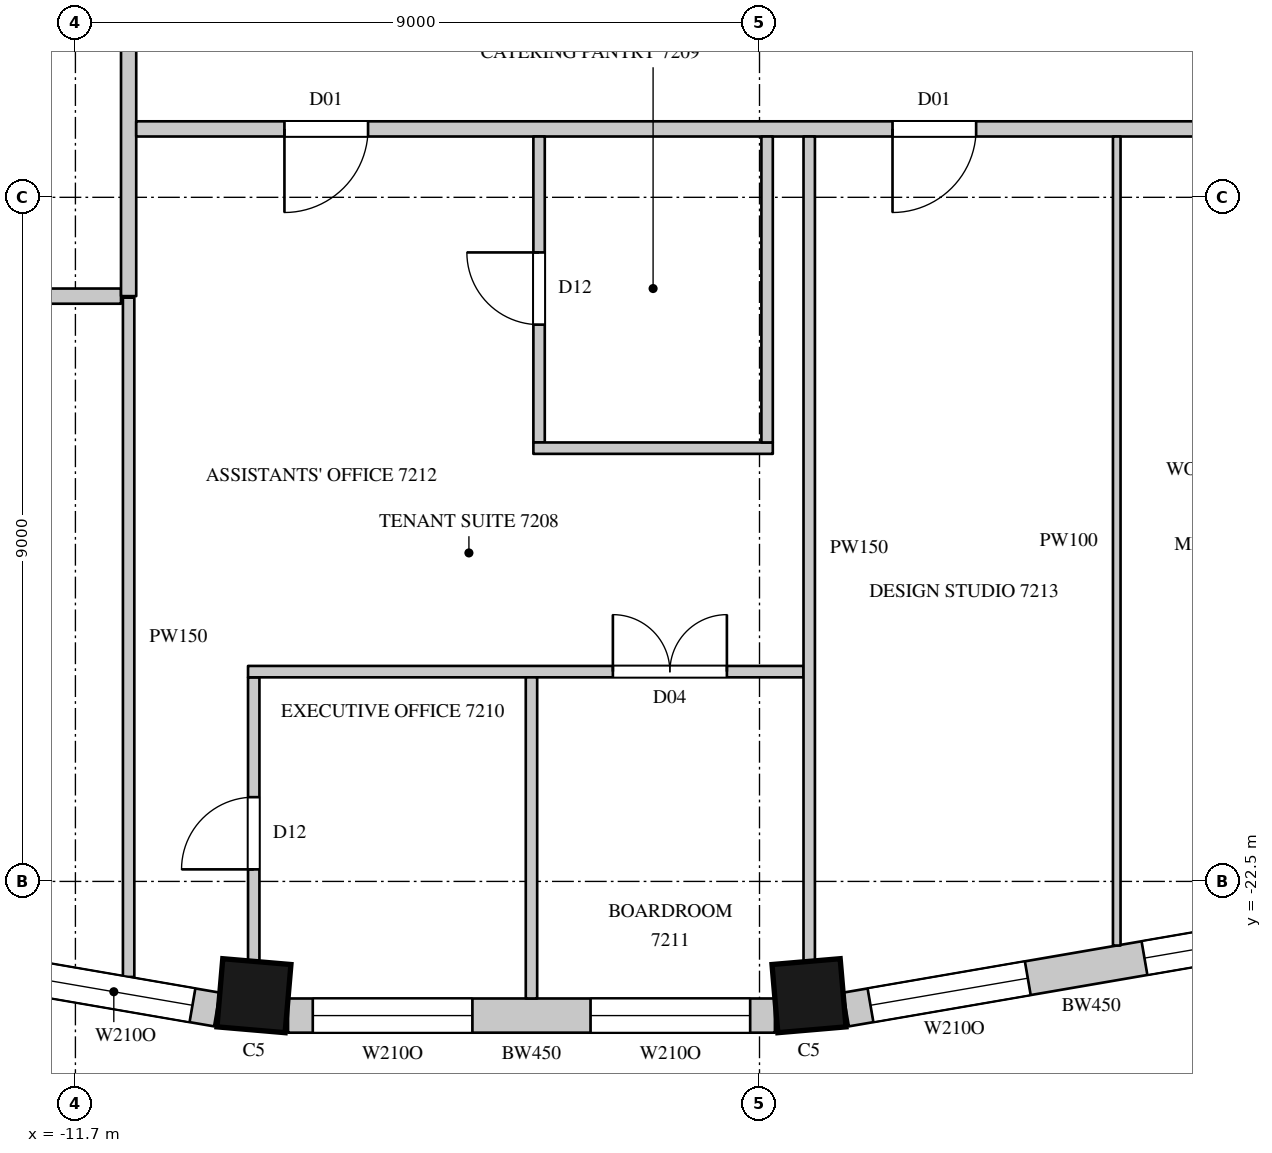
"""IFC4 building model, lengths in metres.
Left out: names, types, materials, properties, quantities, classifications, styles, units other than length and angle.
Written with IfcOpenShell. Run it as: python <this file> out.ifc"""

import sys

from ifc_helpers import new_model, si_unit, direction, frame, frame_2d, origin, origin_2d, place, context, subcontext, project, spatial, rectangle, extrude, element, fill, save


model = new_model("IFC4")
c1 = context("Model", 3, precision=1e-05, world=origin(), true_north=direction((0.0, 1.0)))
c2 = subcontext(c1, "Body", "Model", "MODEL_VIEW")
j1 = project(units=[si_unit("LENGTHUNIT", "METRE"), si_unit("PLANEANGLEUNIT", "RADIAN")], contexts=[c1])
p1 = place(None, origin())
s1 = spatial("IfcSite", under=j1, at=p1, CompositionType="ELEMENT")
p2 = place(p1, origin())
s2 = spatial("IfcBuilding", under=s1, at=p2, CompositionType="ELEMENT")
p3 = place(p2, frame((0.0, 0.0, 317.2)))
s3 = spatial("IfcBuildingStorey", under=s2, at=p3, CompositionType="ELEMENT", Elevation=317.2)
for number, where, z_axis, x_axis in (
    (1, (-9.351, -24.003, 0.0), (0.0, 0.0, 1.0), (0.996, -0.085, 0.0)),
    (2, (-2.049, -24.003, 0.0), (0.0, 0.0, 1.0), (0.996, 0.085, 0.0)),
):
    element("IfcColumn", number, at=place(p3, frame(where, z_axis=z_axis, x_axis=x_axis)), inside=s3, PredefinedType="COLUMN", context=c2, shape_type="SweptSolid", body=[
        extrude(rectangle(XDim=0.9, YDim=0.9, at=origin_2d()), origin(), (0.0, 0.0, 1.0), 4.1),
    ])
p4 = place(p3, frame((-16.157, -23.097, 0.0), z_axis=(0.0, 0.0, 1.0), x_axis=(0.985502073964, -0.169663379113, 0.0)))
e3 = element("IfcWall", 3, at=p4, inside=s3, PredefinedType="SOLIDWALL", context=c2, shape_type="SweptSolid", body=[
    extrude(rectangle(XDim=6.412, YDim=0.45, at=frame_2d((3.206, 0.0))), origin(), (0.0, 0.0, 1.0), 3.8),
])
p5 = place(p4, frame((0.327, 0.0, 1.05)))
e4 = element("IfcOpeningElement", 4, at=p5, cuts=e3, PredefinedType="OPENING", context=c2, shape_type="SweptSolid", body=[
    extrude(rectangle(XDim=2.1, YDim=2.4, at=frame_2d((1.05, 1.2))), frame((0.0, 0.235, 0.0), z_axis=(0.0, -1.0, 0.0), x_axis=(1.0, 0.0, 0.0)), (0.0, 0.0, 1.0), 0.47),
])
p6 = place(p4, frame((3.985, 0.0, 1.05)))
e5 = element("IfcOpeningElement", 5, at=p6, cuts=e3, PredefinedType="OPENING", context=c2, shape_type="SweptSolid", body=[
    extrude(rectangle(XDim=2.1, YDim=2.4, at=frame_2d((1.05, 1.2))), frame((0.0, 0.235, 0.0), z_axis=(0.0, -1.0, 0.0), x_axis=(1.0, 0.0, 0.0)), (0.0, 0.0, 1.0), 0.47),
])
p7 = place(p3, frame((-8.903, -24.265, 0.0), z_axis=(0.0, 0.0, 1.0), x_axis=(1.0, 0.0, 0.0)))
e6 = element("IfcWall", 6, at=p7, inside=s3, PredefinedType="SOLIDWALL", context=c2, shape_type="SweptSolid", body=[
    extrude(rectangle(XDim=6.406, YDim=0.45, at=frame_2d((3.203, 0.0))), origin(), (0.0, 0.0, 1.0), 3.8),
])
p8 = place(p7, frame((0.325, 0.0, 1.05)))
e7 = element("IfcOpeningElement", 7, at=p8, cuts=e6, PredefinedType="OPENING", context=c2, shape_type="SweptSolid", body=[
    extrude(rectangle(XDim=2.1, YDim=2.4, at=frame_2d((1.05, 1.2))), frame((0.0, 0.235, 0.0), z_axis=(0.0, -1.0, 0.0), x_axis=(1.0, 0.0, 0.0)), (0.0, 0.0, 1.0), 0.47),
])
p9 = place(p7, frame((3.98, 0.0, 1.05)))
e8 = element("IfcOpeningElement", 8, at=p9, cuts=e6, PredefinedType="OPENING", context=c2, shape_type="SweptSolid", body=[
    extrude(rectangle(XDim=2.1, YDim=2.4, at=frame_2d((1.05, 1.2))), frame((0.0, 0.235, 0.0), z_axis=(0.0, -1.0, 0.0), x_axis=(1.0, 0.0, 0.0)), (0.0, 0.0, 1.0), 0.47),
])
p10 = place(p3, frame((-1.562, -24.185, 0.0), z_axis=(0.0, 0.0, 1.0), x_axis=(0.985502073964, 0.169663379113, 0.0)))
e9 = element("IfcWall", 9, at=p10, inside=s3, PredefinedType="SOLIDWALL", context=c2, shape_type="SweptSolid", body=[
    extrude(rectangle(XDim=6.412, YDim=0.45, at=frame_2d((3.206, 0.0))), origin(), (0.0, 0.0, 1.0), 3.8),
])
p11 = place(p10, frame((0.327, 0.0, 1.05)))
e10 = element("IfcOpeningElement", 10, at=p11, cuts=e9, PredefinedType="OPENING", context=c2, shape_type="SweptSolid", body=[
    extrude(rectangle(XDim=2.1, YDim=2.4, at=frame_2d((1.05, 1.2))), frame((0.0, 0.235, 0.0), z_axis=(0.0, -1.0, 0.0), x_axis=(1.0, 0.0, 0.0)), (0.0, 0.0, 1.0), 0.47),
])
p12 = place(p10, frame((3.985, 0.0, 1.05)))
e11 = element("IfcOpeningElement", 11, at=p12, cuts=e9, PredefinedType="OPENING", context=c2, shape_type="SweptSolid", body=[
    extrude(rectangle(XDim=2.1, YDim=2.4, at=frame_2d((1.05, 1.2))), frame((0.0, 0.235, 0.0), z_axis=(0.0, -1.0, 0.0), x_axis=(1.0, 0.0, 0.0)), (0.0, 0.0, 1.0), 0.47),
])
p13 = place(p3, frame((-13.97, -14.8, 0.0), z_axis=(0.0, 0.0, 1.0), x_axis=(1.0, 0.0, 0.0)))
e12 = element("IfcWall", 12, at=p13, inside=s3, PredefinedType="PARTITIONING", context=c2, shape_type="SweptSolid", body=[
    extrude(rectangle(XDim=2.87, YDim=0.2, at=frame_2d((1.435, 0.0))), origin(), (0.0, 0.0, 1.0), 3.8),
])
p14 = place(p3, frame((-11.0, -14.8, 0.0), z_axis=(0.0, 0.0, 1.0), x_axis=(0.0, 1.0, 0.0)))
e13 = element("IfcWall", 13, at=p14, inside=s3, PredefinedType="PARTITIONING", context=c2, shape_type="SweptSolid", body=[
    extrude(rectangle(XDim=29.5, YDim=0.2, at=frame_2d((14.75, 0.0))), origin(), (0.0, 0.0, 1.0), 3.8),
])
p15 = place(p14, frame((7.75, 0.0, 0.0)))
e14 = element("IfcOpeningElement", 14, at=p15, cuts=e13, PredefinedType="OPENING", context=c2, shape_type="SweptSolid", body=[
    extrude(rectangle(XDim=1.5, YDim=2.4, at=frame_2d((0.75, 1.2))), frame((0.0, 0.11, 0.0), z_axis=(0.0, -1.0, 0.0), x_axis=(1.0, 0.0, 0.0)), (0.0, 0.0, 1.0), 0.22),
])
p16 = place(p3, frame((-10.9, -12.6, 0.0), z_axis=(0.0, 0.0, 1.0), x_axis=(1.0, 0.0, 0.0)))
e15 = element("IfcWall", 15, at=p16, inside=s3, PredefinedType="PARTITIONING", context=c2, shape_type="SweptSolid", body=[
    extrude(rectangle(XDim=22.6, YDim=0.2, at=frame_2d((11.3, 0.0))), origin(), (0.0, 0.0, 1.0), 3.8),
])
p17 = place(p16, frame((14.1, 0.0, 0.0)))
e16 = element("IfcOpeningElement", 16, at=p17, cuts=e15, PredefinedType="OPENING", context=c2, shape_type="SweptSolid", body=[
    extrude(rectangle(XDim=0.9, YDim=2.2, at=frame_2d((0.45, 1.1))), frame((0.0, 0.11, 0.0), z_axis=(0.0, -1.0, 0.0), x_axis=(1.0, 0.0, 0.0)), (0.0, 0.0, 1.0), 0.22),
])
p18 = place(p16, frame((17.4, 0.0, 0.0)))
e17 = element("IfcOpeningElement", 17, at=p18, cuts=e15, PredefinedType="OPENING", context=c2, shape_type="SweptSolid", body=[
    extrude(rectangle(XDim=0.9, YDim=2.2, at=frame_2d((0.45, 1.1))), frame((0.0, 0.11, 0.0), z_axis=(0.0, -1.0, 0.0), x_axis=(1.0, 0.0, 0.0)), (0.0, 0.0, 1.0), 0.22),
])
p19 = place(p16, frame((20.25, 0.0, 0.0)))
e18 = element("IfcOpeningElement", 18, at=p19, cuts=e15, PredefinedType="OPENING", context=c2, shape_type="SweptSolid", body=[
    extrude(rectangle(XDim=0.9, YDim=2.2, at=frame_2d((0.45, 1.1))), frame((0.0, 0.11, 0.0), z_axis=(0.0, -1.0, 0.0), x_axis=(1.0, 0.0, 0.0)), (0.0, 0.0, 1.0), 0.22),
])
p20 = place(p16, frame((1.95, 0.0, 0.0)))
e19 = element("IfcOpeningElement", 19, at=p20, cuts=e15, PredefinedType="OPENING", context=c2, shape_type="SweptSolid", body=[
    extrude(rectangle(XDim=1.1, YDim=2.4, at=frame_2d((0.55, 1.2))), frame((0.0, 0.11, 0.0), z_axis=(0.0, -1.0, 0.0), x_axis=(1.0, 0.0, 0.0)), (0.0, 0.0, 1.0), 0.22),
])
p21 = place(p16, frame((9.95, 0.0, 0.0)))
e20 = element("IfcOpeningElement", 20, at=p21, cuts=e15, PredefinedType="OPENING", context=c2, shape_type="SweptSolid", body=[
    extrude(rectangle(XDim=1.1, YDim=2.4, at=frame_2d((0.55, 1.2))), frame((0.0, 0.11, 0.0), z_axis=(0.0, -1.0, 0.0), x_axis=(1.0, 0.0, 0.0)), (0.0, 0.0, 1.0), 0.22),
])
p22 = place(p3, frame((-11.0, -23.757, 0.0), z_axis=(0.0, 0.0, 1.0), x_axis=(0.0, 1.0, 0.0)))
e21 = element("IfcWall", 21, at=p22, inside=s3, PredefinedType="PARTITIONING", context=c2, shape_type="SweptSolid", body=[
    extrude(rectangle(XDim=8.937, YDim=0.15, at=frame_2d((4.468, 0.0))), origin(), (0.0, 0.0, 1.0), 3.8),
])
p23 = place(p3, frame((-9.354, -23.542, 0.0), z_axis=(0.0, 0.0, 1.0), x_axis=(0.0, 1.0, 0.0)))
e22 = element("IfcWall", 22, at=p23, inside=s3, PredefinedType="PARTITIONING", context=c2, shape_type="SweptSolid", body=[
    extrude(rectangle(XDim=3.727, YDim=0.15, at=frame_2d((1.863, 0.0))), origin(), (0.0, 0.0, 1.0), 3.8),
])
p24 = place(p23, frame((1.2, 0.0, 0.0)))
e23 = element("IfcOpeningElement", 23, at=p24, cuts=e22, PredefinedType="OPENING", context=c2, shape_type="SweptSolid", body=[
    extrude(rectangle(XDim=0.95, YDim=2.2, at=frame_2d((0.475, 1.1))), frame((0.0, 0.085, 0.0), z_axis=(0.0, -1.0, 0.0), x_axis=(1.0, 0.0, 0.0)), (0.0, 0.0, 1.0), 0.17),
])
p25 = place(p3, frame((-9.429, -19.74, 0.0), z_axis=(0.0, 0.0, 1.0), x_axis=(1.0, 0.0, 0.0)))
e24 = element("IfcWall", 24, at=p25, inside=s3, PredefinedType="PARTITIONING", context=c2, shape_type="SweptSolid", body=[
    extrude(rectangle(XDim=7.308, YDim=0.15, at=frame_2d((3.654, 0.0))), origin(), (0.0, 0.0, 1.0), 3.8),
])
p26 = place(p25, frame((4.8, 0.0, 0.0)))
e25 = element("IfcOpeningElement", 25, at=p26, cuts=e24, PredefinedType="OPENING", context=c2, shape_type="SweptSolid", body=[
    extrude(rectangle(XDim=1.5, YDim=2.2, at=frame_2d((0.75, 1.1))), frame((0.0, 0.085, 0.0), z_axis=(0.0, -1.0, 0.0), x_axis=(1.0, 0.0, 0.0)), (0.0, 0.0, 1.0), 0.17),
])
p27 = place(p3, frame((-5.7, -24.04, 0.0), z_axis=(0.0, 0.0, 1.0), x_axis=(0.0, 1.0, 0.0)))
e26 = element("IfcWall", 26, at=p27, inside=s3, PredefinedType="PARTITIONING", context=c2, shape_type="SweptSolid", body=[
    extrude(rectangle(XDim=4.225, YDim=0.15, at=frame_2d((2.113, 0.0))), origin(), (0.0, 0.0, 1.0), 3.8),
])
p28 = place(p3, frame((-5.6, -16.725, 0.0), z_axis=(0.0, 0.0, 1.0), x_axis=(0.0, 1.0, 0.0)))
e27 = element("IfcWall", 27, at=p28, inside=s3, PredefinedType="PARTITIONING", context=c2, shape_type="SweptSolid", body=[
    extrude(rectangle(XDim=4.025, YDim=0.15, at=frame_2d((2.013, 0.0))), origin(), (0.0, 0.0, 1.0), 3.8),
])
p29 = place(p28, frame((1.55, 0.0, 0.0)))
e28 = element("IfcOpeningElement", 28, at=p29, cuts=e27, PredefinedType="OPENING", context=c2, shape_type="SweptSolid", body=[
    extrude(rectangle(XDim=0.95, YDim=2.2, at=frame_2d((0.475, 1.1))), frame((0.0, 0.085, 0.0), z_axis=(0.0, -1.0, 0.0), x_axis=(1.0, 0.0, 0.0)), (0.0, 0.0, 1.0), 0.17),
])
p30 = place(p3, frame((-5.675, -16.8, 0.0), z_axis=(0.0, 0.0, 1.0), x_axis=(1.0, 0.0, 0.0)))
e29 = element("IfcWall", 29, at=p30, inside=s3, PredefinedType="PARTITIONING", context=c2, shape_type="SweptSolid", body=[
    extrude(rectangle(XDim=3.15, YDim=0.15, at=frame_2d((1.575, 0.0))), origin(), (0.0, 0.0, 1.0), 3.8),
])
p31 = place(p3, frame((-2.6, -16.725, 0.0), z_axis=(0.0, 0.0, 1.0), x_axis=(0.0, 1.0, 0.0)))
e30 = element("IfcWall", 30, at=p31, inside=s3, PredefinedType="PARTITIONING", context=c2, shape_type="SweptSolid", body=[
    extrude(rectangle(XDim=4.025, YDim=0.15, at=frame_2d((2.013, 0.0))), origin(), (0.0, 0.0, 1.0), 3.8),
])
p32 = place(p3, frame((-2.046, -23.542, 0.0), z_axis=(0.0, 0.0, 1.0), x_axis=(0.0, 1.0, 0.0)))
e31 = element("IfcWall", 31, at=p32, inside=s3, PredefinedType="PARTITIONING", context=c2, shape_type="SweptSolid", body=[
    extrude(rectangle(XDim=10.842, YDim=0.15, at=frame_2d((5.421, 0.0))), origin(), (0.0, 0.0, 1.0), 3.8),
])
p33 = place(p3, frame((2.0, -23.344, 0.0), z_axis=(0.0, 0.0, 1.0), x_axis=(0.0, 1.0, 0.0)))
e32 = element("IfcWall", 32, at=p33, inside=s3, PredefinedType="PARTITIONING", context=c2, shape_type="SweptSolid", body=[
    extrude(rectangle(XDim=10.644, YDim=0.1, at=frame_2d((5.322, 0.0))), origin(), (0.0, 0.0, 1.0), 3.8),
])
p34 = place(p6, origin())
e33 = element("IfcWindow", 33, at=p34, inside=s3, PartitioningType="SINGLE_PANEL", PredefinedType="WINDOW", context=c2, shape_type="SweptSolid", body=[
    extrude(rectangle(XDim=2.1, YDim=2.4, at=frame_2d((1.05, 1.2))), frame((0.0, 0.135, 0.0), z_axis=(0.0, -1.0, 0.0), x_axis=(1.0, 0.0, 0.0)), (0.0, 0.0, 1.0), 0.06),
])
fill(e5, e33)
p35 = place(p8, origin())
e34 = element("IfcWindow", 34, at=p35, inside=s3, PartitioningType="SINGLE_PANEL", PredefinedType="WINDOW", context=c2, shape_type="SweptSolid", body=[
    extrude(rectangle(XDim=2.1, YDim=2.4, at=frame_2d((1.05, 1.2))), frame((0.0, 0.135, 0.0), z_axis=(0.0, -1.0, 0.0), x_axis=(1.0, 0.0, 0.0)), (0.0, 0.0, 1.0), 0.06),
])
fill(e7, e34)
p36 = place(p9, origin())
e35 = element("IfcWindow", 35, at=p36, inside=s3, PartitioningType="SINGLE_PANEL", PredefinedType="WINDOW", context=c2, shape_type="SweptSolid", body=[
    extrude(rectangle(XDim=2.1, YDim=2.4, at=frame_2d((1.05, 1.2))), frame((0.0, 0.135, 0.0), z_axis=(0.0, -1.0, 0.0), x_axis=(1.0, 0.0, 0.0)), (0.0, 0.0, 1.0), 0.06),
])
fill(e8, e35)
p37 = place(p11, origin())
e36 = element("IfcWindow", 36, at=p37, inside=s3, PartitioningType="SINGLE_PANEL", PredefinedType="WINDOW", context=c2, shape_type="SweptSolid", body=[
    extrude(rectangle(XDim=2.1, YDim=2.4, at=frame_2d((1.05, 1.2))), frame((0.0, 0.135, 0.0), z_axis=(0.0, -1.0, 0.0), x_axis=(1.0, 0.0, 0.0)), (0.0, 0.0, 1.0), 0.06),
])
fill(e10, e36)
p38 = place(p12, origin())
e37 = element("IfcWindow", 37, at=p38, inside=s3, PartitioningType="SINGLE_PANEL", PredefinedType="WINDOW", context=c2, shape_type="SweptSolid", body=[
    extrude(rectangle(XDim=2.1, YDim=2.4, at=frame_2d((1.05, 1.2))), frame((0.0, 0.135, 0.0), z_axis=(0.0, -1.0, 0.0), x_axis=(1.0, 0.0, 0.0)), (0.0, 0.0, 1.0), 0.06),
])
fill(e11, e37)
p39 = place(p20, origin())
e38 = element("IfcDoor", 38, at=p39, inside=s3, OperationType="SINGLE_SWING_RIGHT", PredefinedType="DOOR", context=c2, shape_type="SweptSolid", body=[
    extrude(rectangle(XDim=1.1, YDim=2.4, at=frame_2d((0.55, 1.2))), frame((0.0, 0.025, 0.0), z_axis=(0.0, -1.0, 0.0), x_axis=(1.0, 0.0, 0.0)), (0.0, 0.0, 1.0), 0.05),
])
fill(e19, e38)
p40 = place(p29, origin())
e39 = element("IfcDoor", 39, at=p40, inside=s3, OperationType="SINGLE_SWING_RIGHT", PredefinedType="DOOR", context=c2, shape_type="SweptSolid", body=[
    extrude(rectangle(XDim=0.95, YDim=2.2, at=frame_2d((0.475, 1.1))), frame((0.0, 0.025, 0.0), z_axis=(0.0, -1.0, 0.0), x_axis=(1.0, 0.0, 0.0)), (0.0, 0.0, 1.0), 0.05),
])
fill(e28, e39)
p41 = place(p24, origin())
e40 = element("IfcDoor", 40, at=p41, inside=s3, OperationType="SINGLE_SWING_LEFT", PredefinedType="DOOR", context=c2, shape_type="SweptSolid", body=[
    extrude(rectangle(XDim=0.95, YDim=2.2, at=frame_2d((0.475, 1.1))), frame((0.0, 0.025, 0.0), z_axis=(0.0, -1.0, 0.0), x_axis=(1.0, 0.0, 0.0)), (0.0, 0.0, 1.0), 0.05),
])
fill(e23, e40)
p42 = place(p26, origin())
e41 = element("IfcDoor", 41, at=p42, inside=s3, OperationType="DOUBLE_DOOR_SINGLE_SWING", PredefinedType="DOOR", context=c2, shape_type="SweptSolid", body=[
    extrude(rectangle(XDim=1.5, YDim=2.2, at=frame_2d((0.75, 1.1))), frame((0.0, 0.025, 0.0), z_axis=(0.0, -1.0, 0.0), x_axis=(1.0, 0.0, 0.0)), (0.0, 0.0, 1.0), 0.05),
])
fill(e25, e41)
p43 = place(p21, origin())
e42 = element("IfcDoor", 42, at=p43, inside=s3, OperationType="SINGLE_SWING_RIGHT", PredefinedType="DOOR", context=c2, shape_type="SweptSolid", body=[
    extrude(rectangle(XDim=1.1, YDim=2.4, at=frame_2d((0.55, 1.2))), frame((0.0, 0.025, 0.0), z_axis=(0.0, -1.0, 0.0), x_axis=(1.0, 0.0, 0.0)), (0.0, 0.0, 1.0), 0.05),
])
fill(e20, e42)
save(model, sys.argv[1])
